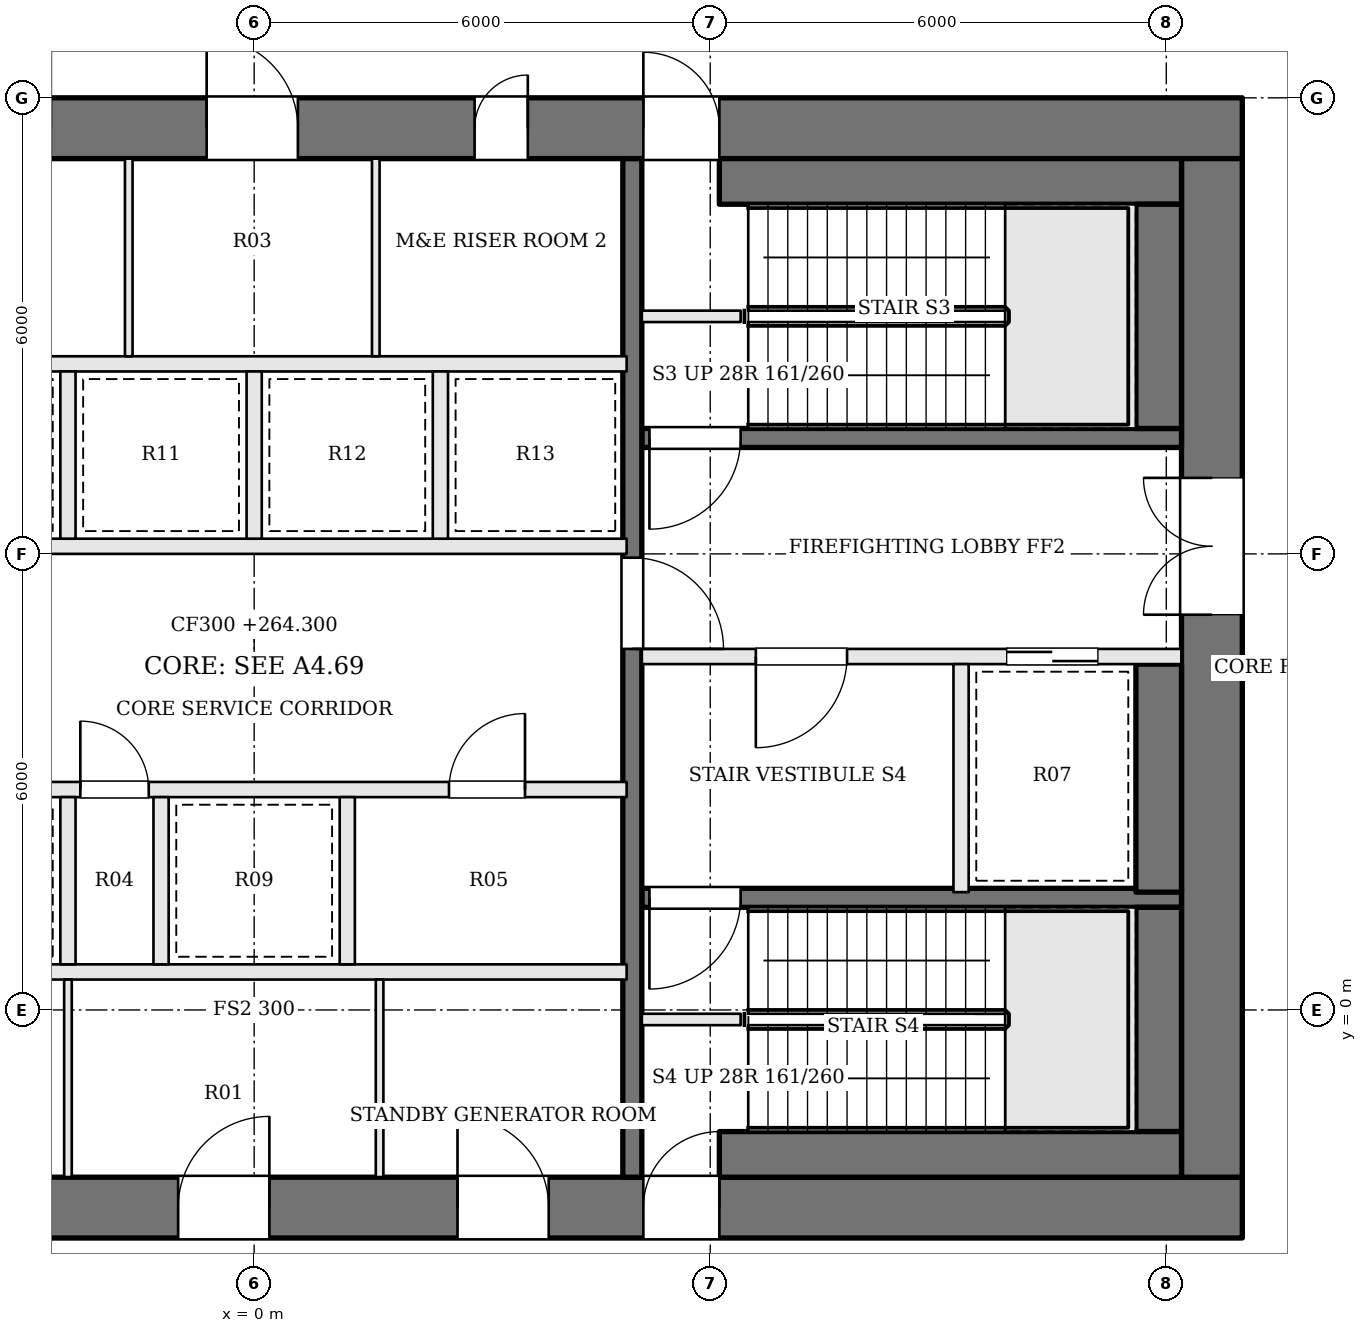
"""IFC4 building model, lengths in metres.
Left out: names, types, materials, properties, quantities, classifications, styles, units other than length and angle.
Written with IfcOpenShell. Run it as: python <this file> out.ifc"""

import sys

from ifc_helpers import new_model, si_unit, direction, frame, frame_2d, origin, place, context, subcontext, project, spatial, rectangle, extrude, element, fill, save


model = new_model("IFC4")
c1 = context("Model", 3, precision=1e-05, world=origin(), true_north=direction((0.0, 1.0)))
c2 = subcontext(c1, "Body", "Model", "MODEL_VIEW")
j1 = project(units=[si_unit("LENGTHUNIT", "METRE"), si_unit("PLANEANGLEUNIT", "RADIAN")], contexts=[c1])
p1 = place(None, origin())
s1 = spatial("IfcSite", under=j1, at=p1, CompositionType="ELEMENT")
p2 = place(p1, origin())
s2 = spatial("IfcBuilding", under=s1, at=p2, CompositionType="ELEMENT")
p3 = place(p2, frame((0.0, 0.0, 264.3)))
s3 = spatial("IfcBuildingStorey", under=s2, at=p3, CompositionType="ELEMENT", Elevation=264.3)
p4 = place(p3, frame((-13.0, 11.6, 0.0), z_axis=(0.0, 0.0, 1.0), x_axis=(1.0, 0.0, 0.0)))
e1 = element("IfcWall", 1, at=p4, inside=s3, PredefinedType="SHEAR", context=c2, shape_type="SweptSolid", body=[
    extrude(rectangle(XDim=26.0, YDim=0.8, at=frame_2d((13.0, 0.0))), origin(), (0.0, 0.0, 1.0), 4.5),
])
p5 = place(p4, frame((9.125, 0.0, 0.0)))
e2 = element("IfcOpeningElement", 2, at=p5, cuts=e1, PredefinedType="OPENING", context=c2, shape_type="SweptSolid", body=[
    extrude(rectangle(XDim=1.2, YDim=2.1, at=frame_2d((0.6, 1.05))), frame((0.0, 0.41, 0.0), z_axis=(0.0, -1.0, 0.0), x_axis=(1.0, 0.0, 0.0)), (0.0, 0.0, 1.0), 0.82),
])
p6 = place(p4, frame((12.375, 0.0, 0.0)))
e3 = element("IfcOpeningElement", 3, at=p6, cuts=e1, PredefinedType="OPENING", context=c2, shape_type="SweptSolid", body=[
    extrude(rectangle(XDim=1.2, YDim=2.1, at=frame_2d((0.6, 1.05))), frame((0.0, 0.41, 0.0), z_axis=(0.0, -1.0, 0.0), x_axis=(1.0, 0.0, 0.0)), (0.0, 0.0, 1.0), 0.82),
])
p7 = place(p4, frame((15.9, 0.0, 0.0)))
e4 = element("IfcOpeningElement", 4, at=p7, cuts=e1, PredefinedType="OPENING", context=c2, shape_type="SweptSolid", body=[
    extrude(rectangle(XDim=0.7, YDim=2.1, at=frame_2d((0.35, 1.05))), frame((0.0, 0.41, 0.0), z_axis=(0.0, -1.0, 0.0), x_axis=(1.0, 0.0, 0.0)), (0.0, 0.0, 1.0), 0.82),
])
p8 = place(p4, frame((6.88, 0.0, 0.0)))
e5 = element("IfcOpeningElement", 5, at=p8, cuts=e1, PredefinedType="OPENING", context=c2, shape_type="SweptSolid", body=[
    extrude(rectangle(XDim=1.0, YDim=2.1, at=frame_2d((0.5, 1.05))), frame((0.0, 0.41, 0.0), z_axis=(0.0, -1.0, 0.0), x_axis=(1.0, 0.0, 0.0)), (0.0, 0.0, 1.0), 0.82),
])
p9 = place(p4, frame((18.12, 0.0, 0.0)))
e6 = element("IfcOpeningElement", 6, at=p9, cuts=e1, PredefinedType="OPENING", context=c2, shape_type="SweptSolid", body=[
    extrude(rectangle(XDim=1.0, YDim=2.1, at=frame_2d((0.5, 1.05))), frame((0.0, 0.41, 0.0), z_axis=(0.0, -1.0, 0.0), x_axis=(1.0, 0.0, 0.0)), (0.0, 0.0, 1.0), 0.82),
])
p10 = place(p3, frame((-13.0, -2.6, 0.0), z_axis=(0.0, 0.0, 1.0), x_axis=(1.0, 0.0, 0.0)))
e7 = element("IfcWall", 7, at=p10, inside=s3, PredefinedType="SHEAR", context=c2, shape_type="SweptSolid", body=[
    extrude(rectangle(XDim=26.0, YDim=0.8, at=frame_2d((13.0, 0.0))), origin(), (0.0, 0.0, 1.0), 4.5),
])
p11 = place(p10, frame((8.975, 0.0, 0.0)))
e8 = element("IfcOpeningElement", 8, at=p11, cuts=e7, PredefinedType="OPENING", context=c2, shape_type="SweptSolid", body=[
    extrude(rectangle(XDim=0.7, YDim=2.1, at=frame_2d((0.35, 1.05))), frame((0.0, 0.41, 0.0), z_axis=(0.0, -1.0, 0.0), x_axis=(1.0, 0.0, 0.0)), (0.0, 0.0, 1.0), 0.82),
])
p12 = place(p10, frame((12.0, 0.0, 0.0)))
e9 = element("IfcOpeningElement", 9, at=p12, cuts=e7, PredefinedType="OPENING", context=c2, shape_type="SweptSolid", body=[
    extrude(rectangle(XDim=1.2, YDim=2.1, at=frame_2d((0.6, 1.05))), frame((0.0, 0.41, 0.0), z_axis=(0.0, -1.0, 0.0), x_axis=(1.0, 0.0, 0.0)), (0.0, 0.0, 1.0), 0.82),
])
p13 = place(p10, frame((15.675, 0.0, 0.0)))
e10 = element("IfcOpeningElement", 10, at=p13, cuts=e7, PredefinedType="OPENING", context=c2, shape_type="SweptSolid", body=[
    extrude(rectangle(XDim=1.2, YDim=2.1, at=frame_2d((0.6, 1.05))), frame((0.0, 0.41, 0.0), z_axis=(0.0, -1.0, 0.0), x_axis=(1.0, 0.0, 0.0)), (0.0, 0.0, 1.0), 0.82),
])
p14 = place(p10, frame((6.88, 0.0, 0.0)))
e11 = element("IfcOpeningElement", 11, at=p14, cuts=e7, PredefinedType="OPENING", context=c2, shape_type="SweptSolid", body=[
    extrude(rectangle(XDim=1.0, YDim=2.1, at=frame_2d((0.5, 1.05))), frame((0.0, 0.41, 0.0), z_axis=(0.0, -1.0, 0.0), x_axis=(1.0, 0.0, 0.0)), (0.0, 0.0, 1.0), 0.82),
])
p15 = place(p10, frame((18.12, 0.0, 0.0)))
e12 = element("IfcOpeningElement", 12, at=p15, cuts=e7, PredefinedType="OPENING", context=c2, shape_type="SweptSolid", body=[
    extrude(rectangle(XDim=1.0, YDim=2.1, at=frame_2d((0.5, 1.05))), frame((0.0, 0.41, 0.0), z_axis=(0.0, -1.0, 0.0), x_axis=(1.0, 0.0, 0.0)), (0.0, 0.0, 1.0), 0.82),
])
p16 = place(p3, frame((12.6, -2.2, 0.0), z_axis=(0.0, 0.0, 1.0), x_axis=(0.0, 1.0, 0.0)))
e13 = element("IfcWall", 13, at=p16, inside=s3, PredefinedType="SHEAR", context=c2, shape_type="SweptSolid", body=[
    extrude(rectangle(XDim=13.4, YDim=0.8, at=frame_2d((6.7, 0.0))), origin(), (0.0, 0.0, 1.0), 4.5),
])
p17 = place(p16, frame((7.4, 0.0, 0.0)))
e14 = element("IfcOpeningElement", 14, at=p17, cuts=e13, PredefinedType="OPENING", context=c2, shape_type="SweptSolid", body=[
    extrude(rectangle(XDim=1.8, YDim=2.1, at=frame_2d((0.9, 1.05))), frame((0.0, 0.41, 0.0), z_axis=(0.0, -1.0, 0.0), x_axis=(1.0, 0.0, 0.0)), (0.0, 0.0, 1.0), 0.82),
])
for number, where, z_axis, x_axis in (
    (15, (6.4, 9.125, 0.0), (0.0, 0.0, 1.0), (-1.0, 0.0, 0.0)),
    (16, (6.4, -0.125, 0.0), (0.0, 0.0, 1.0), (-1.0, 0.0, 0.0)),
):
    element("IfcWall", number, at=place(p3, frame(where, z_axis=z_axis, x_axis=x_axis)), inside=s3, PredefinedType="SOLIDWALL", context=c2, shape_type="SweptSolid", body=[
        extrude(rectangle(XDim=1.3, YDim=0.15, at=frame_2d((0.65, 0.0))), origin(), (0.0, 0.0, 1.0), 4.3),
    ])
p18 = place(p3, frame((12.2, 7.525, 0.0), z_axis=(0.0, 0.0, 1.0), x_axis=(-1.0, 0.0, 0.0)))
e17 = element("IfcWall", 17, at=p18, inside=s3, PredefinedType="SOLIDWALL", context=c2, shape_type="SweptSolid", body=[
    extrude(rectangle(XDim=7.1, YDim=0.25, at=frame_2d((3.55, 0.0))), origin(), (0.0, 0.0, 1.0), 4.3),
])
p19 = place(p18, frame((5.8, 0.0, 0.0)))
e18 = element("IfcOpeningElement", 18, at=p19, cuts=e17, PredefinedType="OPENING", context=c2, shape_type="SweptSolid", body=[
    extrude(rectangle(XDim=1.2, YDim=2.1, at=frame_2d((0.6, 1.05))), frame((0.0, 0.135, 0.0), z_axis=(0.0, -1.0, 0.0), x_axis=(1.0, 0.0, 0.0)), (0.0, 0.0, 1.0), 0.27),
])
p20 = place(p3, frame((12.2, 4.65, 0.0), z_axis=(0.0, 0.0, 1.0), x_axis=(-1.0, 0.0, 0.0)))
e19 = element("IfcWall", 19, at=p20, inside=s3, PredefinedType="SOLIDWALL", context=c2, shape_type="SweptSolid", body=[
    extrude(rectangle(XDim=7.1, YDim=0.2, at=frame_2d((3.55, 0.0))), origin(), (0.0, 0.0, 1.0), 4.3),
])
p21 = place(p20, frame((4.4, 0.0, 0.0)))
e20 = element("IfcOpeningElement", 20, at=p21, cuts=e19, PredefinedType="OPENING", context=c2, shape_type="SweptSolid", body=[
    extrude(rectangle(XDim=1.2, YDim=2.1, at=frame_2d((0.6, 1.05))), frame((0.0, 0.11, 0.0), z_axis=(0.0, -1.0, 0.0), x_axis=(1.0, 0.0, 0.0)), (0.0, 0.0, 1.0), 0.22),
])
p22 = place(p20, frame((1.1, 0.0, 0.0)))
e21 = element("IfcOpeningElement", 21, at=p22, cuts=e19, PredefinedType="OPENING", context=c2, shape_type="SweptSolid", body=[
    extrude(rectangle(XDim=1.2, YDim=2.1, at=frame_2d((0.6, 1.05))), frame((0.0, 0.11, 0.0), z_axis=(0.0, -1.0, 0.0), x_axis=(1.0, 0.0, 0.0)), (0.0, 0.0, 1.0), 0.22),
])
p23 = place(p3, frame((12.2, 1.475, 0.0), z_axis=(0.0, 0.0, 1.0), x_axis=(-1.0, 0.0, 0.0)))
e22 = element("IfcWall", 22, at=p23, inside=s3, PredefinedType="SOLIDWALL", context=c2, shape_type="SweptSolid", body=[
    extrude(rectangle(XDim=7.1, YDim=0.25, at=frame_2d((3.55, 0.0))), origin(), (0.0, 0.0, 1.0), 4.3),
])
p24 = place(p23, frame((5.8, 0.0, 0.0)))
e23 = element("IfcOpeningElement", 23, at=p24, cuts=e22, PredefinedType="OPENING", context=c2, shape_type="SweptSolid", body=[
    extrude(rectangle(XDim=1.2, YDim=2.1, at=frame_2d((0.6, 1.05))), frame((0.0, 0.135, 0.0), z_axis=(0.0, -1.0, 0.0), x_axis=(1.0, 0.0, 0.0)), (0.0, 0.0, 1.0), 0.27),
])
p25 = place(p3, frame((9.3, 4.55, 0.0), z_axis=(0.0, 0.0, 1.0), x_axis=(0.0, -1.0, 0.0)))
e24 = element("IfcWall", 24, at=p25, inside=s3, PredefinedType="SOLIDWALL", context=c2, shape_type="SweptSolid", body=[
    extrude(rectangle(XDim=3.0, YDim=0.2, at=frame_2d((1.5, 0.0))), origin(), (0.0, 0.0, 1.0), 4.3),
])
p26 = place(p3, frame((4.975, 11.2, 0.0), z_axis=(0.0, 0.0, 1.0), x_axis=(0.0, -1.0, 0.0)))
e25 = element("IfcWall", 25, at=p26, inside=s3, PredefinedType="SOLIDWALL", context=c2, shape_type="SweptSolid", body=[
    extrude(rectangle(XDim=13.4, YDim=0.25, at=frame_2d((6.7, 0.0))), origin(), (0.0, 0.0, 1.0), 4.3),
])
p27 = place(p26, frame((5.25, 0.0, 0.0)))
e26 = element("IfcOpeningElement", 26, at=p27, cuts=e25, PredefinedType="OPENING", context=c2, shape_type="SweptSolid", body=[
    extrude(rectangle(XDim=1.2, YDim=2.1, at=frame_2d((0.6, 1.05))), frame((0.0, 0.135, 0.0), z_axis=(0.0, -1.0, 0.0), x_axis=(1.0, 0.0, 0.0)), (0.0, 0.0, 1.0), 0.27),
])
p28 = place(p3, frame((12.2, 10.9, 0.0), z_axis=(0.0, 0.0, 1.0), x_axis=(-1.0, 0.0, 0.0)))
e27 = element("IfcWall", 27, at=p28, inside=s3, PredefinedType="SOLIDWALL", context=c2, shape_type="SweptSolid", body=[
    extrude(rectangle(XDim=6.08, YDim=0.6, at=frame_2d((3.04, 0.0))), origin(), (0.0, 0.0, 1.0), 4.3),
])
p29 = place(p3, frame((11.9, 10.6, 0.0), z_axis=(0.0, 0.0, 1.0), x_axis=(0.0, -1.0, 0.0)))
e28 = element("IfcWall", 28, at=p29, inside=s3, PredefinedType="SOLIDWALL", context=c2, shape_type="SweptSolid", body=[
    extrude(rectangle(XDim=2.95, YDim=0.6, at=frame_2d((1.475, 0.0))), origin(), (0.0, 0.0, 1.0), 4.3),
])
p30 = place(p3, frame((11.9, 4.55, 0.0), z_axis=(0.0, 0.0, 1.0), x_axis=(0.0, -1.0, 0.0)))
e29 = element("IfcWall", 29, at=p30, inside=s3, PredefinedType="SOLIDWALL", context=c2, shape_type="SweptSolid", body=[
    extrude(rectangle(XDim=3.0, YDim=0.6, at=frame_2d((1.5, 0.0))), origin(), (0.0, 0.0, 1.0), 4.3),
])
p31 = place(p3, frame((11.9, 1.35, 0.0), z_axis=(0.0, 0.0, 1.0), x_axis=(0.0, -1.0, 0.0)))
e30 = element("IfcWall", 30, at=p31, inside=s3, PredefinedType="SOLIDWALL", context=c2, shape_type="SweptSolid", body=[
    extrude(rectangle(XDim=2.95, YDim=0.6, at=frame_2d((1.475, 0.0))), origin(), (0.0, 0.0, 1.0), 4.3),
])
p32 = place(p3, frame((12.2, -1.9, 0.0), z_axis=(0.0, 0.0, 1.0), x_axis=(-1.0, 0.0, 0.0)))
e31 = element("IfcWall", 31, at=p32, inside=s3, PredefinedType="SOLIDWALL", context=c2, shape_type="SweptSolid", body=[
    extrude(rectangle(XDim=6.08, YDim=0.6, at=frame_2d((3.04, 0.0))), origin(), (0.0, 0.0, 1.0), 4.3),
])
p33 = place(p3, frame((-4.9, 0.5, 0.0), z_axis=(0.0, 0.0, 1.0), x_axis=(1.0, 0.0, 0.0)))
e32 = element("IfcWall", 32, at=p33, inside=s3, PredefinedType="SOLIDWALL", context=c2, shape_type="SweptSolid", body=[
    extrude(rectangle(XDim=9.8, YDim=0.2, at=frame_2d((4.9, 0.0))), origin(), (0.0, 0.0, 1.0), 4.3),
])
p34 = place(p3, frame((-4.9, 2.9, 0.0), z_axis=(0.0, 0.0, 1.0), x_axis=(1.0, 0.0, 0.0)))
e33 = element("IfcWall", 33, at=p34, inside=s3, PredefinedType="SOLIDWALL", context=c2, shape_type="SweptSolid", body=[
    extrude(rectangle(XDim=9.8, YDim=0.2, at=frame_2d((4.9, 0.0))), origin(), (0.0, 0.0, 1.0), 4.3),
])
p35 = place(p34, frame((2.613, 0.0, 0.0)))
e34 = element("IfcOpeningElement", 34, at=p35, cuts=e33, PredefinedType="OPENING", context=c2, shape_type="SweptSolid", body=[
    extrude(rectangle(XDim=0.9, YDim=2.1, at=frame_2d((0.45, 1.05))), frame((0.0, 0.11, 0.0), z_axis=(0.0, -1.0, 0.0), x_axis=(1.0, 0.0, 0.0)), (0.0, 0.0, 1.0), 0.22),
])
p36 = place(p34, frame((7.463, 0.0, 0.0)))
e35 = element("IfcOpeningElement", 35, at=p36, cuts=e33, PredefinedType="OPENING", context=c2, shape_type="SweptSolid", body=[
    extrude(rectangle(XDim=1.0, YDim=2.1, at=frame_2d((0.5, 1.05))), frame((0.0, 0.11, 0.0), z_axis=(0.0, -1.0, 0.0), x_axis=(1.0, 0.0, 0.0)), (0.0, 0.0, 1.0), 0.22),
])
for number, where, z_axis, x_axis in (
    (36, (-4.9, 6.1, 0.0), (0.0, 0.0, 1.0), (1.0, 0.0, 0.0)),
    (37, (-4.9, 8.5, 0.0), (0.0, 0.0, 1.0), (1.0, 0.0, 0.0)),
):
    element("IfcWall", number, at=place(p3, frame(where, z_axis=z_axis, x_axis=x_axis)), inside=s3, PredefinedType="SOLIDWALL", context=c2, shape_type="SweptSolid", body=[
        extrude(rectangle(XDim=9.8, YDim=0.2, at=frame_2d((4.9, 0.0))), origin(), (0.0, 0.0, 1.0), 4.3),
    ])
for number, where, z_axis, x_axis in (
    (38, (-2.45, 0.6, 0.0), (0.0, 0.0, 1.0), (0.0, 1.0, 0.0)),
    (39, (-1.225, 0.6, 0.0), (0.0, 0.0, 1.0), (0.0, 1.0, 0.0)),
    (40, (1.225, 0.6, 0.0), (0.0, 0.0, 1.0), (0.0, 1.0, 0.0)),
    (41, (-2.45, 6.2, 0.0), (0.0, 0.0, 1.0), (0.0, 1.0, 0.0)),
    (42, (0.0, 6.2, 0.0), (0.0, 0.0, 1.0), (0.0, 1.0, 0.0)),
    (43, (2.45, 6.2, 0.0), (0.0, 0.0, 1.0), (0.0, 1.0, 0.0)),
):
    element("IfcWall", number, at=place(p3, frame(where, z_axis=z_axis, x_axis=x_axis)), inside=s3, PredefinedType="SOLIDWALL", context=c2, shape_type="SweptSolid", body=[
        extrude(rectangle(XDim=2.2, YDim=0.2, at=frame_2d((1.1, 0.0))), origin(), (0.0, 0.0, 1.0), 4.3),
    ])
for number, where, z_axis, x_axis in (
    (44, (-2.45, -2.2, 0.0), (0.0, 0.0, 1.0), (0.0, 1.0, 0.0)),
    (45, (1.65, -2.2, 0.0), (0.0, 0.0, 1.0), (0.0, 1.0, 0.0)),
    (46, (-1.65, 8.6, 0.0), (0.0, 0.0, 1.0), (0.0, 1.0, 0.0)),
    (47, (1.6, 8.6, 0.0), (0.0, 0.0, 1.0), (0.0, 1.0, 0.0)),
):
    element("IfcWall", number, at=place(p3, frame(where, z_axis=z_axis, x_axis=x_axis)), inside=s3, PredefinedType="PARTITIONING", context=c2, shape_type="SweptSolid", body=[
        extrude(rectangle(XDim=2.6, YDim=0.1, at=frame_2d((1.3, 0.0))), origin(), (0.0, 0.0, 1.0), 4.3),
    ])
p37 = place(p17, origin())
e48 = element("IfcDoor", 48, at=p37, inside=s3, OperationType="DOUBLE_DOOR_SINGLE_SWING", PredefinedType="DOOR", context=c2, shape_type="SweptSolid", body=[
    extrude(rectangle(XDim=1.8, YDim=2.1, at=frame_2d((0.9, 1.05))), frame((0.0, 0.025, 0.0), z_axis=(0.0, -1.0, 0.0), x_axis=(1.0, 0.0, 0.0)), (0.0, 0.0, 1.0), 0.05),
])
fill(e14, e48)
p38 = place(p27, origin())
e49 = element("IfcDoor", 49, at=p38, inside=s3, OperationType="SINGLE_SWING_RIGHT", PredefinedType="DOOR", context=c2, shape_type="SweptSolid", body=[
    extrude(rectangle(XDim=1.2, YDim=2.1, at=frame_2d((0.6, 1.05))), frame((0.0, 0.025, 0.0), z_axis=(0.0, -1.0, 0.0), x_axis=(1.0, 0.0, 0.0)), (0.0, 0.0, 1.0), 0.05),
])
fill(e26, e49)
p39 = place(p21, origin())
e50 = element("IfcDoor", 50, at=p39, inside=s3, OperationType="SINGLE_SWING_RIGHT", PredefinedType="DOOR", context=c2, shape_type="SweptSolid", body=[
    extrude(rectangle(XDim=1.2, YDim=2.1, at=frame_2d((0.6, 1.05))), frame((0.0, 0.025, 0.0), z_axis=(0.0, -1.0, 0.0), x_axis=(1.0, 0.0, 0.0)), (0.0, 0.0, 1.0), 0.05),
])
fill(e20, e50)
p40 = place(p19, origin())
e51 = element("IfcDoor", 51, at=p40, inside=s3, OperationType="SINGLE_SWING_RIGHT", PredefinedType="DOOR", context=c2, shape_type="SweptSolid", body=[
    extrude(rectangle(XDim=1.2, YDim=2.1, at=frame_2d((0.6, 1.05))), frame((0.0, 0.025, 0.0), z_axis=(0.0, -1.0, 0.0), x_axis=(1.0, 0.0, 0.0)), (0.0, 0.0, 1.0), 0.05),
])
fill(e18, e51)
p41 = place(p24, origin())
e52 = element("IfcDoor", 52, at=p41, inside=s3, OperationType="SINGLE_SWING_RIGHT", PredefinedType="DOOR", context=c2, shape_type="SweptSolid", body=[
    extrude(rectangle(XDim=1.2, YDim=2.1, at=frame_2d((0.6, 1.05))), frame((0.0, 0.025, 0.0), z_axis=(0.0, -1.0, 0.0), x_axis=(1.0, 0.0, 0.0)), (0.0, 0.0, 1.0), 0.05),
])
fill(e23, e52)
p42 = place(p22, origin())
e53 = element("IfcDoor", 53, at=p42, inside=s3, OperationType="SLIDING_TO_RIGHT", PredefinedType="DOOR", context=c2, shape_type="SweptSolid", body=[
    extrude(rectangle(XDim=1.2, YDim=2.1, at=frame_2d((0.6, 1.05))), frame((0.0, 0.025, 0.0), z_axis=(0.0, -1.0, 0.0), x_axis=(1.0, 0.0, 0.0)), (0.0, 0.0, 1.0), 0.05),
])
fill(e21, e53)
p43 = place(p35, origin())
e54 = element("IfcDoor", 54, at=p43, inside=s3, OperationType="SINGLE_SWING_LEFT", PredefinedType="DOOR", context=c2, shape_type="SweptSolid", body=[
    extrude(rectangle(XDim=0.9, YDim=2.1, at=frame_2d((0.45, 1.05))), frame((0.0, 0.025, 0.0), z_axis=(0.0, -1.0, 0.0), x_axis=(1.0, 0.0, 0.0)), (0.0, 0.0, 1.0), 0.05),
])
fill(e34, e54)
p44 = place(p36, origin())
e55 = element("IfcDoor", 55, at=p44, inside=s3, OperationType="SINGLE_SWING_RIGHT", PredefinedType="DOOR", context=c2, shape_type="SweptSolid", body=[
    extrude(rectangle(XDim=1.0, YDim=2.1, at=frame_2d((0.5, 1.05))), frame((0.0, 0.025, 0.0), z_axis=(0.0, -1.0, 0.0), x_axis=(1.0, 0.0, 0.0)), (0.0, 0.0, 1.0), 0.05),
])
fill(e35, e55)
p45 = place(p12, origin())
e56 = element("IfcDoor", 56, at=p45, inside=s3, OperationType="SINGLE_SWING_RIGHT", PredefinedType="DOOR", context=c2, shape_type="SweptSolid", body=[
    extrude(rectangle(XDim=1.2, YDim=2.1, at=frame_2d((0.6, 1.05))), frame((0.0, 0.025, 0.0), z_axis=(0.0, -1.0, 0.0), x_axis=(1.0, 0.0, 0.0)), (0.0, 0.0, 1.0), 0.05),
])
fill(e9, e56)
p46 = place(p13, origin())
e57 = element("IfcDoor", 57, at=p46, inside=s3, OperationType="SINGLE_SWING_LEFT", PredefinedType="DOOR", context=c2, shape_type="SweptSolid", body=[
    extrude(rectangle(XDim=1.2, YDim=2.1, at=frame_2d((0.6, 1.05))), frame((0.0, 0.025, 0.0), z_axis=(0.0, -1.0, 0.0), x_axis=(1.0, 0.0, 0.0)), (0.0, 0.0, 1.0), 0.05),
])
fill(e10, e57)
p47 = place(p6, origin())
e58 = element("IfcDoor", 58, at=p47, inside=s3, OperationType="SINGLE_SWING_LEFT", PredefinedType="DOOR", context=c2, shape_type="SweptSolid", body=[
    extrude(rectangle(XDim=1.2, YDim=2.1, at=frame_2d((0.6, 1.05))), frame((0.0, 0.025, 0.0), z_axis=(0.0, -1.0, 0.0), x_axis=(1.0, 0.0, 0.0)), (0.0, 0.0, 1.0), 0.05),
])
fill(e3, e58)
p48 = place(p7, origin())
e59 = element("IfcDoor", 59, at=p48, inside=s3, OperationType="SINGLE_SWING_RIGHT", PredefinedType="DOOR", context=c2, shape_type="SweptSolid", body=[
    extrude(rectangle(XDim=0.7, YDim=2.1, at=frame_2d((0.35, 1.05))), frame((0.0, 0.025, 0.0), z_axis=(0.0, -1.0, 0.0), x_axis=(1.0, 0.0, 0.0)), (0.0, 0.0, 1.0), 0.05),
])
fill(e4, e59)
p49 = place(p9, origin())
e60 = element("IfcDoor", 60, at=p49, inside=s3, OperationType="SINGLE_SWING_LEFT", PredefinedType="DOOR", context=c2, shape_type="SweptSolid", body=[
    extrude(rectangle(XDim=1.0, YDim=2.1, at=frame_2d((0.5, 1.05))), frame((0.0, 0.025, 0.0), z_axis=(0.0, -1.0, 0.0), x_axis=(1.0, 0.0, 0.0)), (0.0, 0.0, 1.0), 0.05),
])
fill(e6, e60)
p50 = place(p15, origin())
e61 = element("IfcDoor", 61, at=p50, inside=s3, OperationType="SINGLE_SWING_RIGHT", PredefinedType="DOOR", context=c2, shape_type="SweptSolid", body=[
    extrude(rectangle(XDim=1.0, YDim=2.1, at=frame_2d((0.5, 1.05))), frame((0.0, 0.025, 0.0), z_axis=(0.0, -1.0, 0.0), x_axis=(1.0, 0.0, 0.0)), (0.0, 0.0, 1.0), 0.05),
])
fill(e12, e61)
save(model, sys.argv[1])
